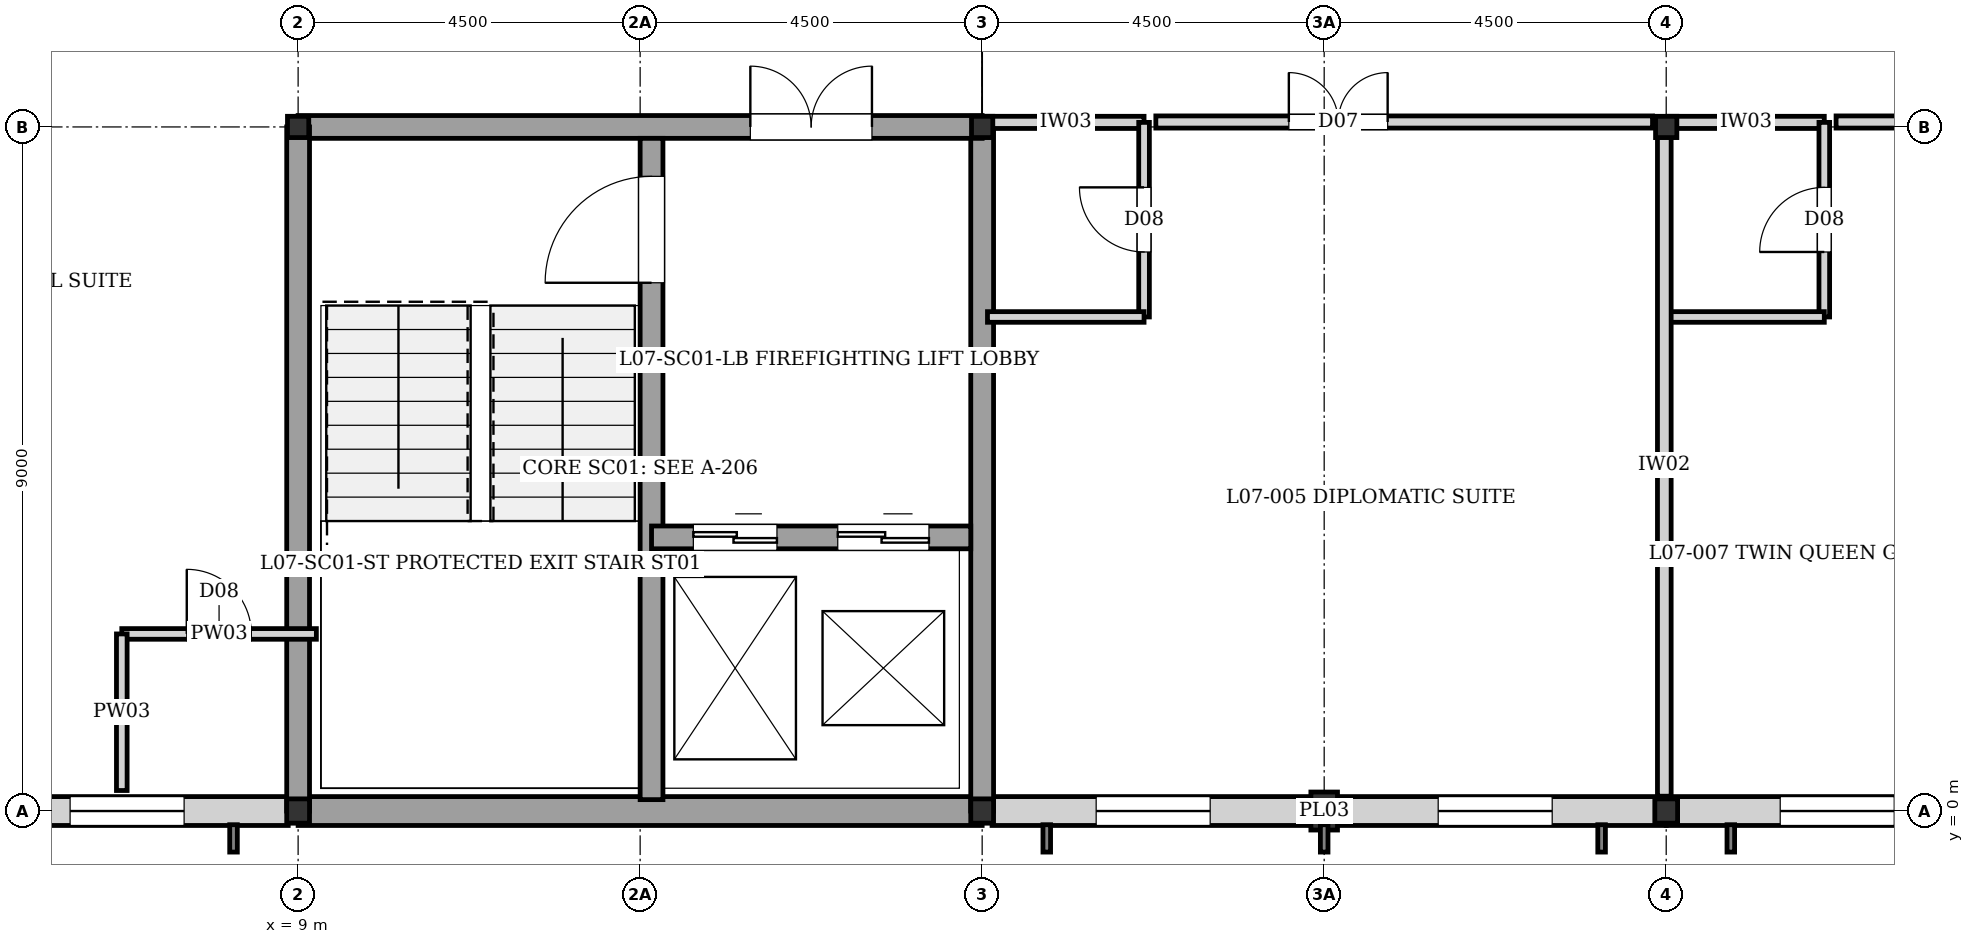
"""IFC4 building model, lengths in metres.
Left out: names, types, materials, properties, quantities, classifications, styles, units other than length and angle.
Written with IfcOpenShell. Run it as: python <this file> out.ifc"""

import sys

from ifc_helpers import new_model, si_unit, direction, frame, frame_2d, origin, origin_2d, place, context, subcontext, project, spatial, rectangle, i_section, extrude, element, fill, save


model = new_model("IFC4")
c1 = context("Model", 3, precision=1e-05, world=origin(), true_north=direction((0.0, 1.0)))
c2 = subcontext(c1, "Body", "Model", "MODEL_VIEW")
j1 = project(units=[si_unit("LENGTHUNIT", "METRE"), si_unit("PLANEANGLEUNIT", "RADIAN")], contexts=[c1])
p1 = place(None, origin())
s1 = spatial("IfcSite", under=j1, at=p1, CompositionType="ELEMENT")
p2 = place(p1, origin())
s2 = spatial("IfcBuilding", under=s1, at=p2, CompositionType="ELEMENT")
p3 = place(p2, frame((0.0, 0.0, 23.68)))
s3 = spatial("IfcBuildingStorey", under=s2, at=p3, CompositionType="ELEMENT", Elevation=23.68)
p4 = place(p3, frame((9.0, 0.0, 0.0), z_axis=(0.0, 0.0, 1.0), x_axis=(1.0, 0.0, 0.0)))
e1 = element("IfcColumn", 1, at=p4, inside=s3, PredefinedType="COLUMN", context=c2, shape_type="SweptSolid", body=[
    extrude(i_section(OverallWidth=0.3, OverallDepth=0.32, WebThickness=0.011, FlangeThickness=0.021, at=origin_2d()), origin(), (0.0, 0.0, 1.0), 3.2),
])
p5 = place(p3, frame((9.0, 9.0, 0.0), z_axis=(0.0, 0.0, 1.0), x_axis=(1.0, 0.0, 0.0)))
e2 = element("IfcColumn", 2, at=p5, inside=s3, PredefinedType="COLUMN", context=c2, shape_type="SweptSolid", body=[
    extrude(i_section(OverallWidth=0.28, OverallDepth=0.28, WebThickness=0.01, FlangeThickness=0.018, at=origin_2d()), origin(), (0.0, 0.0, 1.0), 3.2),
])
p6 = place(p3, frame((18.0, 0.0, 0.0), z_axis=(0.0, 0.0, 1.0), x_axis=(1.0, 0.0, 0.0)))
e3 = element("IfcColumn", 3, at=p6, inside=s3, PredefinedType="COLUMN", context=c2, shape_type="SweptSolid", body=[
    extrude(i_section(OverallWidth=0.3, OverallDepth=0.32, WebThickness=0.011, FlangeThickness=0.021, at=origin_2d()), origin(), (0.0, 0.0, 1.0), 3.2),
])
p7 = place(p3, frame((18.0, 9.0, 0.0), z_axis=(0.0, 0.0, 1.0), x_axis=(1.0, 0.0, 0.0)))
e4 = element("IfcColumn", 4, at=p7, inside=s3, PredefinedType="COLUMN", context=c2, shape_type="SweptSolid", body=[
    extrude(i_section(OverallWidth=0.28, OverallDepth=0.28, WebThickness=0.01, FlangeThickness=0.018, at=origin_2d()), origin(), (0.0, 0.0, 1.0), 3.2),
])
p8 = place(p3, frame((27.0, 0.0, 0.0), z_axis=(0.0, 0.0, 1.0), x_axis=(1.0, 0.0, 0.0)))
e5 = element("IfcColumn", 5, at=p8, inside=s3, PredefinedType="COLUMN", context=c2, shape_type="SweptSolid", body=[
    extrude(i_section(OverallWidth=0.3, OverallDepth=0.32, WebThickness=0.011, FlangeThickness=0.021, at=origin_2d()), origin(), (0.0, 0.0, 1.0), 3.2),
])
p9 = place(p3, frame((27.0, 9.0, 0.0), z_axis=(0.0, 0.0, 1.0), x_axis=(1.0, 0.0, 0.0)))
e6 = element("IfcColumn", 6, at=p9, inside=s3, PredefinedType="COLUMN", context=c2, shape_type="SweptSolid", body=[
    extrude(i_section(OverallWidth=0.28, OverallDepth=0.28, WebThickness=0.01, FlangeThickness=0.018, at=origin_2d()), origin(), (0.0, 0.0, 1.0), 3.2),
])
p10 = place(p3, frame((22.5, 0.0, 0.0), z_axis=(0.0, 0.0, 1.0), x_axis=(1.0, 0.0, 0.0)))
e7 = element("IfcColumn", 7, at=p10, inside=s3, PredefinedType="PILASTER", context=c2, shape_type="SweptSolid", body=[
    extrude(rectangle(XDim=0.35, YDim=0.5, at=origin_2d()), origin(), (0.0, 0.0, 1.0), 3.2),
])
p11 = place(p3, frame((35.87, 0.0, 0.0), z_axis=(0.0, 0.0, 1.0), x_axis=(-1.0, 0.0, 0.0)))
e8 = element("IfcWall", 8, at=p11, inside=s3, PredefinedType="SOLIDWALL", context=c2, shape_type="SweptSolid", body=[
    extrude(rectangle(XDim=8.87, YDim=0.38, at=frame_2d((4.435, 0.0))), origin(), (0.0, 0.0, 1.0), 2.73),
])
p12 = place(p11, frame((1.37, 0.0, 0.35)))
e9 = element("IfcOpeningElement", 9, at=p12, cuts=e8, PredefinedType="OPENING", context=c2, shape_type="SweptSolid", body=[
    extrude(rectangle(XDim=1.5, YDim=1.8, at=frame_2d((0.75, 0.9))), frame((0.0, 0.2, 0.0), z_axis=(0.0, -1.0, 0.0), x_axis=(1.0, 0.0, 0.0)), (0.0, 0.0, 1.0), 0.4),
])
p13 = place(p11, frame((5.87, 0.0, 0.35)))
e10 = element("IfcOpeningElement", 10, at=p13, cuts=e8, PredefinedType="OPENING", context=c2, shape_type="SweptSolid", body=[
    extrude(rectangle(XDim=1.5, YDim=1.8, at=frame_2d((0.75, 0.9))), frame((0.0, 0.2, 0.0), z_axis=(0.0, -1.0, 0.0), x_axis=(1.0, 0.0, 0.0)), (0.0, 0.0, 1.0), 0.4),
])
p14 = place(p3, frame((27.0, 0.0, 0.0), z_axis=(0.0, 0.0, 1.0), x_axis=(-1.0, 0.0, 0.0)))
e11 = element("IfcWall", 11, at=p14, inside=s3, PredefinedType="SOLIDWALL", context=c2, shape_type="SweptSolid", body=[
    extrude(rectangle(XDim=8.87, YDim=0.38, at=frame_2d((4.435, 0.0))), origin(), (0.0, 0.0, 1.0), 2.56),
])
p15 = place(p14, frame((1.5, 0.0, 0.35)))
e12 = element("IfcOpeningElement", 12, at=p15, cuts=e11, PredefinedType="OPENING", context=c2, shape_type="SweptSolid", body=[
    extrude(rectangle(XDim=1.5, YDim=1.8, at=frame_2d((0.75, 0.9))), frame((0.0, 0.2, 0.0), z_axis=(0.0, -1.0, 0.0), x_axis=(1.0, 0.0, 0.0)), (0.0, 0.0, 1.0), 0.4),
])
p16 = place(p14, frame((6.0, 0.0, 0.35)))
e13 = element("IfcOpeningElement", 13, at=p16, cuts=e11, PredefinedType="OPENING", context=c2, shape_type="SweptSolid", body=[
    extrude(rectangle(XDim=1.5, YDim=1.8, at=frame_2d((0.75, 0.9))), frame((0.0, 0.2, 0.0), z_axis=(0.0, -1.0, 0.0), x_axis=(1.0, 0.0, 0.0)), (0.0, 0.0, 1.0), 0.4),
])
p17 = place(p3, frame((18.0, 0.0, 0.0), z_axis=(0.0, 0.0, 1.0), x_axis=(-1.0, 0.0, 0.0)))
e14 = element("IfcWall", 14, at=p17, inside=s3, PredefinedType="SOLIDWALL", context=c2, shape_type="SweptSolid", body=[
    extrude(rectangle(XDim=9.0, YDim=0.38, at=frame_2d((4.5, 0.0))), origin(), (0.0, 0.0, 1.0), 2.96),
])
p18 = place(p3, frame((8.87, 0.0, 0.0), z_axis=(0.0, 0.0, 1.0), x_axis=(-1.0, 0.0, 0.0)))
e15 = element("IfcWall", 15, at=p18, inside=s3, PredefinedType="SOLIDWALL", context=c2, shape_type="SweptSolid", body=[
    extrude(rectangle(XDim=8.87, YDim=0.38, at=frame_2d((4.435, 0.0))), origin(), (0.0, 0.0, 1.0), 2.66),
])
p19 = place(p18, frame((1.37, 0.0, 0.35)))
e16 = element("IfcOpeningElement", 16, at=p19, cuts=e15, PredefinedType="OPENING", context=c2, shape_type="SweptSolid", body=[
    extrude(rectangle(XDim=1.5, YDim=1.8, at=frame_2d((0.75, 0.9))), frame((0.0, 0.2, 0.0), z_axis=(0.0, -1.0, 0.0), x_axis=(1.0, 0.0, 0.0)), (0.0, 0.0, 1.0), 0.4),
])
p20 = place(p18, frame((5.87, 0.0, 0.35)))
e17 = element("IfcOpeningElement", 17, at=p20, cuts=e15, PredefinedType="OPENING", context=c2, shape_type="SweptSolid", body=[
    extrude(rectangle(XDim=1.5, YDim=1.8, at=frame_2d((0.75, 0.9))), frame((0.0, 0.2, 0.0), z_axis=(0.0, -1.0, 0.0), x_axis=(1.0, 0.0, 0.0)), (0.0, 0.0, 1.0), 0.4),
])
p21 = place(p3, frame((18.0, 0.0, 0.0), z_axis=(0.0, 0.0, 1.0), x_axis=(0.0, 1.0, 0.0)))
e18 = element("IfcWall", 18, at=p21, inside=s3, PredefinedType="SHEAR", context=c2, shape_type="SweptSolid", body=[
    extrude(rectangle(XDim=9.0, YDim=0.3, at=frame_2d((4.5, 0.0))), origin(), (0.0, 0.0, 1.0), 2.96),
])
p22 = place(p3, frame((9.0, 9.0, 0.0), z_axis=(0.0, 0.0, 1.0), x_axis=(1.0, 0.0, 0.0)))
e19 = element("IfcWall", 19, at=p22, inside=s3, PredefinedType="SHEAR", context=c2, shape_type="SweptSolid", body=[
    extrude(rectangle(XDim=9.0, YDim=0.3, at=frame_2d((4.5, 0.0))), origin(), (0.0, 0.0, 1.0), 2.96),
])
p23 = place(p22, frame((5.95, 0.0, 0.0)))
e20 = element("IfcOpeningElement", 20, at=p23, cuts=e19, PredefinedType="OPENING", context=c2, shape_type="SweptSolid", body=[
    extrude(rectangle(XDim=1.6, YDim=2.1, at=frame_2d((0.8, 1.05))), frame((0.0, 0.16, 0.0), z_axis=(0.0, -1.0, 0.0), x_axis=(1.0, 0.0, 0.0)), (0.0, 0.0, 1.0), 0.32),
])
p24 = place(p3, frame((9.0, 0.0, 0.0), z_axis=(0.0, 0.0, 1.0), x_axis=(0.0, 1.0, 0.0)))
e21 = element("IfcWall", 21, at=p24, inside=s3, PredefinedType="SHEAR", context=c2, shape_type="SweptSolid", body=[
    extrude(rectangle(XDim=9.0, YDim=0.3, at=frame_2d((4.5, 0.0))), origin(), (0.0, 0.0, 1.0), 2.96),
])
p25 = place(p3, frame((13.65, 0.15, 0.0), z_axis=(0.0, 0.0, 1.0), x_axis=(0.0, 1.0, 0.0)))
e22 = element("IfcWall", 22, at=p25, inside=s3, PredefinedType="SHEAR", context=c2, shape_type="SweptSolid", body=[
    extrude(rectangle(XDim=8.7, YDim=0.3, at=frame_2d((4.35, 0.0))), origin(), (0.0, 0.0, 1.0), 2.96),
])
p26 = place(p25, frame((6.8, 0.0, 0.0)))
e23 = element("IfcOpeningElement", 23, at=p26, cuts=e22, PredefinedType="OPENING", context=c2, shape_type="SweptSolid", body=[
    extrude(rectangle(XDim=1.4, YDim=2.02, at=frame_2d((0.7, 1.01))), frame((0.0, 0.16, 0.0), z_axis=(0.0, -1.0, 0.0), x_axis=(1.0, 0.0, 0.0)), (0.0, 0.0, 1.0), 0.32),
])
p27 = place(p3, frame((13.65, 3.6, 0.0), z_axis=(0.0, 0.0, 1.0), x_axis=(1.0, 0.0, 0.0)))
e24 = element("IfcWall", 24, at=p27, inside=s3, PredefinedType="SHEAR", context=c2, shape_type="SweptSolid", body=[
    extrude(rectangle(XDim=4.2, YDim=0.3, at=frame_2d((2.1, 0.0))), origin(), (0.0, 0.0, 1.0), 2.96),
])
p28 = place(p27, frame((0.55, 0.0, 0.0)))
e25 = element("IfcOpeningElement", 25, at=p28, cuts=e24, PredefinedType="OPENING", context=c2, shape_type="SweptSolid", body=[
    extrude(rectangle(XDim=1.1, YDim=2.1, at=frame_2d((0.55, 1.05))), frame((0.0, 0.16, 0.0), z_axis=(0.0, -1.0, 0.0), x_axis=(1.0, 0.0, 0.0)), (0.0, 0.0, 1.0), 0.32),
])
p29 = place(p27, frame((2.45, 0.0, 0.0)))
e26 = element("IfcOpeningElement", 26, at=p29, cuts=e24, PredefinedType="OPENING", context=c2, shape_type="SweptSolid", body=[
    extrude(rectangle(XDim=1.2, YDim=2.2, at=frame_2d((0.6, 1.1))), frame((0.0, 0.16, 0.0), z_axis=(0.0, -1.0, 0.0), x_axis=(1.0, 0.0, 0.0)), (0.0, 0.0, 1.0), 0.32),
])
p30 = place(p3, frame((6.68, 2.33, 0.0), z_axis=(0.0, 0.0, 1.0), x_axis=(1.0, 0.0, 0.0)))
e27 = element("IfcWall", 27, at=p30, inside=s3, PredefinedType="PLUMBINGWALL", context=c2, shape_type="SweptSolid", body=[
    extrude(rectangle(XDim=2.56, YDim=0.14, at=frame_2d((1.28, 0.0))), origin(), (0.0, 0.0, 1.0), 2.96),
])
p31 = place(p30, frame((0.855, 0.0, 0.0)))
e28 = element("IfcOpeningElement", 28, at=p31, cuts=e27, PredefinedType="OPENING", context=c2, shape_type="SweptSolid", body=[
    extrude(rectangle(XDim=0.85, YDim=2.04, at=frame_2d((0.425, 1.02))), frame((0.0, 0.08, 0.0), z_axis=(0.0, -1.0, 0.0), x_axis=(1.0, 0.0, 0.0)), (0.0, 0.0, 1.0), 0.16),
])
p32 = place(p3, frame((6.68, 0.27, 0.0), z_axis=(0.0, 0.0, 1.0), x_axis=(0.0, 1.0, 0.0)))
e29 = element("IfcWall", 29, at=p32, inside=s3, PredefinedType="PLUMBINGWALL", context=c2, shape_type="SweptSolid", body=[
    extrude(rectangle(XDim=2.06, YDim=0.14, at=frame_2d((1.03, 0.0))), origin(), (0.0, 0.0, 1.0), 2.96),
])
p33 = place(p3, frame((18.07, 9.06, 0.0), z_axis=(0.0, 0.0, 1.0), x_axis=(1.0, 0.0, 0.0)))
e30 = element("IfcWall", 30, at=p33, inside=s3, PredefinedType="PARTITIONING", context=c2, shape_type="SweptSolid", body=[
    extrude(rectangle(XDim=2.06, YDim=0.16, at=frame_2d((1.03, 0.0))), origin(), (0.0, 0.0, 1.0), 2.6),
])
p34 = place(p3, frame((20.13, 6.5, 0.0), z_axis=(0.0, 0.0, 1.0), x_axis=(0.0, 1.0, 0.0)))
e31 = element("IfcWall", 31, at=p34, inside=s3, PredefinedType="PLUMBINGWALL", context=c2, shape_type="SweptSolid", body=[
    extrude(rectangle(XDim=2.56, YDim=0.14, at=frame_2d((1.28, 0.0))), origin(), (0.0, 0.0, 1.0), 2.96),
])
p35 = place(p34, frame((0.855, 0.0, 0.0)))
e32 = element("IfcOpeningElement", 32, at=p35, cuts=e31, PredefinedType="OPENING", context=c2, shape_type="SweptSolid", body=[
    extrude(rectangle(XDim=0.85, YDim=2.04, at=frame_2d((0.425, 1.02))), frame((0.0, 0.08, 0.0), z_axis=(0.0, -1.0, 0.0), x_axis=(1.0, 0.0, 0.0)), (0.0, 0.0, 1.0), 0.16),
])
p36 = place(p3, frame((18.07, 6.5, 0.0), z_axis=(0.0, 0.0, 1.0), x_axis=(1.0, 0.0, 0.0)))
e33 = element("IfcWall", 33, at=p36, inside=s3, PredefinedType="PLUMBINGWALL", context=c2, shape_type="SweptSolid", body=[
    extrude(rectangle(XDim=2.06, YDim=0.14, at=frame_2d((1.03, 0.0))), origin(), (0.0, 0.0, 1.0), 2.96),
])
p37 = place(p3, frame((27.02, 9.06, 0.0), z_axis=(0.0, 0.0, 1.0), x_axis=(1.0, 0.0, 0.0)))
e34 = element("IfcWall", 34, at=p37, inside=s3, PredefinedType="PARTITIONING", context=c2, shape_type="SweptSolid", body=[
    extrude(rectangle(XDim=2.06, YDim=0.16, at=frame_2d((1.03, 0.0))), origin(), (0.0, 0.0, 1.0), 2.56),
])
p38 = place(p3, frame((29.08, 6.5, 0.0), z_axis=(0.0, 0.0, 1.0), x_axis=(0.0, 1.0, 0.0)))
e35 = element("IfcWall", 35, at=p38, inside=s3, PredefinedType="PLUMBINGWALL", context=c2, shape_type="SweptSolid", body=[
    extrude(rectangle(XDim=2.56, YDim=0.14, at=frame_2d((1.28, 0.0))), origin(), (0.0, 0.0, 1.0), 2.96),
])
p39 = place(p38, frame((0.855, 0.0, 0.0)))
e36 = element("IfcOpeningElement", 36, at=p39, cuts=e35, PredefinedType="OPENING", context=c2, shape_type="SweptSolid", body=[
    extrude(rectangle(XDim=0.85, YDim=2.04, at=frame_2d((0.425, 1.02))), frame((0.0, 0.08, 0.0), z_axis=(0.0, -1.0, 0.0), x_axis=(1.0, 0.0, 0.0)), (0.0, 0.0, 1.0), 0.16),
])
p40 = place(p3, frame((27.02, 6.5, 0.0), z_axis=(0.0, 0.0, 1.0), x_axis=(1.0, 0.0, 0.0)))
e37 = element("IfcWall", 37, at=p40, inside=s3, PredefinedType="PLUMBINGWALL", context=c2, shape_type="SweptSolid", body=[
    extrude(rectangle(XDim=2.06, YDim=0.14, at=frame_2d((1.03, 0.0))), origin(), (0.0, 0.0, 1.0), 2.96),
])
p41 = place(p3, frame((26.975, 0.195, 0.0), z_axis=(0.0, 0.0, 1.0), x_axis=(0.0, 1.0, 0.0)))
e38 = element("IfcWall", 38, at=p41, inside=s3, PredefinedType="PARTITIONING", context=c2, shape_type="SweptSolid", body=[
    extrude(rectangle(XDim=8.71, YDim=0.18, at=frame_2d((4.355, 0.0))), origin(), (0.0, 0.0, 1.0), 2.37),
])
p42 = place(p3, frame((20.285, 9.065, 0.0), z_axis=(0.0, 0.0, 1.0), x_axis=(1.0, 0.0, 0.0)))
e39 = element("IfcWall", 39, at=p42, inside=s3, PredefinedType="PARTITIONING", context=c2, shape_type="SweptSolid", body=[
    extrude(rectangle(XDim=6.535, YDim=0.16, at=frame_2d((3.268, 0.0))), origin(), (0.0, 0.0, 1.0), 2.6),
])
p43 = place(p42, frame((1.75, 0.0, 0.0)))
e40 = element("IfcOpeningElement", 40, at=p43, cuts=e39, PredefinedType="OPENING", context=c2, shape_type="SweptSolid", body=[
    extrude(rectangle(XDim=1.3, YDim=2.25, at=frame_2d((0.65, 1.125))), frame((0.0, 0.09, 0.0), z_axis=(0.0, -1.0, 0.0), x_axis=(1.0, 0.0, 0.0)), (0.0, 0.0, 1.0), 0.18),
])
p44 = place(p3, frame((29.235, 9.065, 0.0), z_axis=(0.0, 0.0, 1.0), x_axis=(1.0, 0.0, 0.0)))
e41 = element("IfcWall", 41, at=p44, inside=s3, PredefinedType="PARTITIONING", context=c2, shape_type="SweptSolid", body=[
    extrude(rectangle(XDim=2.11, YDim=0.16, at=frame_2d((1.055, 0.0))), origin(), (0.0, 0.0, 1.0), 2.56),
])
p45 = place(p44, frame((0.833, 0.0, 0.0)))
e42 = element("IfcOpeningElement", 42, at=p45, cuts=e41, PredefinedType="OPENING", context=c2, shape_type="SweptSolid", body=[
    extrude(rectangle(XDim=0.95, YDim=2.15, at=frame_2d((0.475, 1.075))), frame((0.0, 0.09, 0.0), z_axis=(0.0, -1.0, 0.0), x_axis=(1.0, 0.0, 0.0)), (0.0, 0.0, 1.0), 0.18),
])
p46 = place(p13, origin())
e43 = element("IfcWindow", 43, at=p46, inside=s3, PartitioningType="SINGLE_PANEL", PredefinedType="WINDOW", context=c2, shape_type="SweptSolid", body=[
    extrude(rectangle(XDim=1.5, YDim=1.8, at=frame_2d((0.75, 0.9))), frame((0.0, 0.03, 0.0), z_axis=(0.0, -1.0, 0.0), x_axis=(1.0, 0.0, 0.0)), (0.0, 0.0, 1.0), 0.06),
])
fill(e10, e43)
p47 = place(p15, origin())
e44 = element("IfcWindow", 44, at=p47, inside=s3, PartitioningType="SINGLE_PANEL", PredefinedType="WINDOW", context=c2, shape_type="SweptSolid", body=[
    extrude(rectangle(XDim=1.5, YDim=1.8, at=frame_2d((0.75, 0.9))), frame((0.0, 0.03, 0.0), z_axis=(0.0, -1.0, 0.0), x_axis=(1.0, 0.0, 0.0)), (0.0, 0.0, 1.0), 0.06),
])
fill(e12, e44)
p48 = place(p16, origin())
e45 = element("IfcWindow", 45, at=p48, inside=s3, PartitioningType="SINGLE_PANEL", PredefinedType="WINDOW", context=c2, shape_type="SweptSolid", body=[
    extrude(rectangle(XDim=1.5, YDim=1.8, at=frame_2d((0.75, 0.9))), frame((0.0, 0.03, 0.0), z_axis=(0.0, -1.0, 0.0), x_axis=(1.0, 0.0, 0.0)), (0.0, 0.0, 1.0), 0.06),
])
fill(e13, e45)
p49 = place(p19, origin())
e46 = element("IfcWindow", 46, at=p49, inside=s3, PartitioningType="SINGLE_PANEL", PredefinedType="WINDOW", context=c2, shape_type="SweptSolid", body=[
    extrude(rectangle(XDim=1.5, YDim=1.8, at=frame_2d((0.75, 0.9))), frame((0.0, 0.03, 0.0), z_axis=(0.0, -1.0, 0.0), x_axis=(1.0, 0.0, 0.0)), (0.0, 0.0, 1.0), 0.06),
])
fill(e16, e46)
p50 = place(p23, origin())
e47 = element("IfcDoor", 47, at=p50, inside=s3, OperationType="DOUBLE_DOOR_SINGLE_SWING", PredefinedType="DOOR", context=c2, shape_type="SweptSolid", body=[
    extrude(rectangle(XDim=1.6, YDim=2.1, at=frame_2d((0.8, 1.05))), frame((0.0, 0.025, 0.0), z_axis=(0.0, -1.0, 0.0), x_axis=(1.0, 0.0, 0.0)), (0.0, 0.0, 1.0), 0.05),
])
fill(e20, e47)
p51 = place(p26, origin())
e48 = element("IfcDoor", 48, at=p51, inside=s3, OperationType="SINGLE_SWING_LEFT", PredefinedType="DOOR", context=c2, shape_type="SweptSolid", body=[
    extrude(rectangle(XDim=1.4, YDim=2.02, at=frame_2d((0.7, 1.01))), frame((0.0, 0.025, 0.0), z_axis=(0.0, -1.0, 0.0), x_axis=(1.0, 0.0, 0.0)), (0.0, 0.0, 1.0), 0.05),
])
fill(e23, e48)
p52 = place(p28, origin())
e49 = element("IfcDoor", 49, at=p52, inside=s3, OperationType="DOUBLE_DOOR_SLIDING", PredefinedType="DOOR", context=c2, shape_type="SweptSolid", body=[
    extrude(rectangle(XDim=1.1, YDim=2.1, at=frame_2d((0.55, 1.05))), frame((0.0, 0.025, 0.0), z_axis=(0.0, -1.0, 0.0), x_axis=(1.0, 0.0, 0.0)), (0.0, 0.0, 1.0), 0.05),
])
fill(e25, e49)
p53 = place(p29, origin())
e50 = element("IfcDoor", 50, at=p53, inside=s3, OperationType="DOUBLE_DOOR_SLIDING", PredefinedType="DOOR", context=c2, shape_type="SweptSolid", body=[
    extrude(rectangle(XDim=1.2, YDim=2.2, at=frame_2d((0.6, 1.1))), frame((0.0, 0.025, 0.0), z_axis=(0.0, -1.0, 0.0), x_axis=(1.0, 0.0, 0.0)), (0.0, 0.0, 1.0), 0.05),
])
fill(e26, e50)
p54 = place(p31, origin())
e51 = element("IfcDoor", 51, at=p54, inside=s3, OperationType="SINGLE_SWING_LEFT", PredefinedType="DOOR", context=c2, shape_type="SweptSolid", body=[
    extrude(rectangle(XDim=0.85, YDim=2.04, at=frame_2d((0.425, 1.02))), frame((0.0, 0.025, 0.0), z_axis=(0.0, -1.0, 0.0), x_axis=(1.0, 0.0, 0.0)), (0.0, 0.0, 1.0), 0.05),
])
fill(e28, e51)
p55 = place(p35, origin())
e52 = element("IfcDoor", 52, at=p55, inside=s3, OperationType="SINGLE_SWING_RIGHT", PredefinedType="DOOR", context=c2, shape_type="SweptSolid", body=[
    extrude(rectangle(XDim=0.85, YDim=2.04, at=frame_2d((0.425, 1.02))), frame((0.0, 0.025, 0.0), z_axis=(0.0, -1.0, 0.0), x_axis=(1.0, 0.0, 0.0)), (0.0, 0.0, 1.0), 0.05),
])
fill(e32, e52)
p56 = place(p39, origin())
e53 = element("IfcDoor", 53, at=p56, inside=s3, OperationType="SINGLE_SWING_LEFT", PredefinedType="DOOR", context=c2, shape_type="SweptSolid", body=[
    extrude(rectangle(XDim=0.85, YDim=2.04, at=frame_2d((0.425, 1.02))), frame((0.0, 0.025, 0.0), z_axis=(0.0, -1.0, 0.0), x_axis=(1.0, 0.0, 0.0)), (0.0, 0.0, 1.0), 0.05),
])
fill(e36, e53)
p57 = place(p43, origin())
e54 = element("IfcDoor", 54, at=p57, inside=s3, OperationType="DOUBLE_DOOR_SINGLE_SWING", PredefinedType="DOOR", context=c2, shape_type="SweptSolid", body=[
    extrude(rectangle(XDim=1.3, YDim=2.25, at=frame_2d((0.65, 1.125))), frame((0.0, 0.025, 0.0), z_axis=(0.0, -1.0, 0.0), x_axis=(1.0, 0.0, 0.0)), (0.0, 0.0, 1.0), 0.05),
])
fill(e40, e54)
save(model, sys.argv[1])
